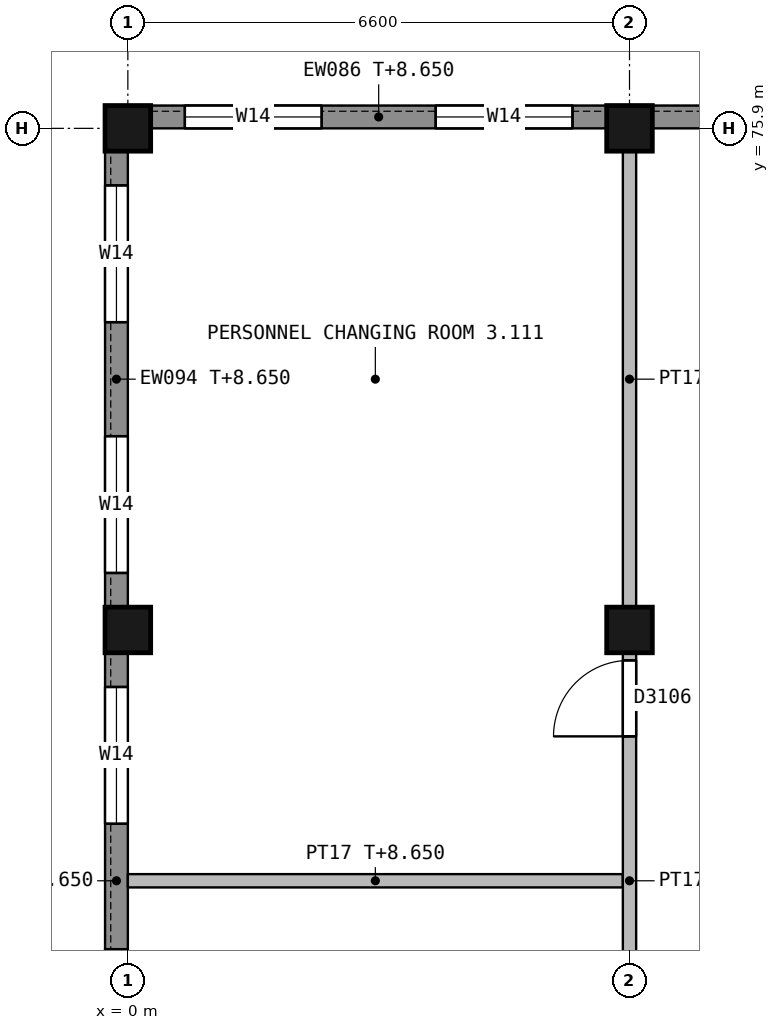
"""IFC4 building model, lengths in metres.
Left out: names, types, materials, properties, quantities, classifications, styles, units other than length and angle.
Written with IfcOpenShell. Run it as: python <this file> out.ifc"""

import sys

from ifc_helpers import new_model, si_unit, direction, frame, frame_2d, origin, origin_2d, place, context, subcontext, project, spatial, rectangle, extrude, element, fill, save


model = new_model("IFC4")
c1 = context("Model", 3, precision=1e-05, world=origin(), true_north=direction((0.0, 1.0)))
c2 = subcontext(c1, "Body", "Model", "MODEL_VIEW")
j1 = project(units=[si_unit("LENGTHUNIT", "METRE"), si_unit("PLANEANGLEUNIT", "RADIAN")], contexts=[c1])
p1 = place(None, origin())
s1 = spatial("IfcSite", under=j1, at=p1, CompositionType="ELEMENT")
p2 = place(p1, origin())
s2 = spatial("IfcBuilding", under=s1, at=p2, CompositionType="ELEMENT")
p3 = place(p2, frame((0.0, 0.0, 5.4)))
s3 = spatial("IfcBuildingStorey", under=s2, at=p3, CompositionType="ELEMENT", Elevation=5.4)
for number, where, z_axis, x_axis in (
    (1, (0.0, 69.3, 0.0), (0.0, 0.0, 1.0), (1.0, 0.0, 0.0)),
    (2, (0.0, 75.9, 0.0), (0.0, 0.0, 1.0), (1.0, 0.0, 0.0)),
    (3, (6.6, 69.3, 0.0), (0.0, 0.0, 1.0), (1.0, 0.0, 0.0)),
    (4, (6.6, 75.9, 0.0), (0.0, 0.0, 1.0), (1.0, 0.0, 0.0)),
):
    element("IfcColumn", number, at=place(p3, frame(where, z_axis=z_axis, x_axis=x_axis)), inside=s3, PredefinedType="COLUMN", context=c2, shape_type="SweptSolid", body=[
        extrude(rectangle(XDim=0.6, YDim=0.6, at=origin_2d()), origin(), (0.0, 0.0, 1.0), 4.5),
    ])
p4 = place(p3, frame((0.3, 76.05, 0.0), z_axis=(0.0, 0.0, 1.0), x_axis=(1.0, 0.0, 0.0)))
e5 = element("IfcWall", 5, at=p4, inside=s3, PredefinedType="STANDARD", context=c2, shape_type="SweptSolid", body=[
    extrude(rectangle(XDim=6.0, YDim=0.3, at=frame_2d((3.0, 0.0))), origin(), (0.0, 0.0, 1.0), 3.25),
])
p5 = place(p4, frame((0.45, 0.0, 0.9)))
e6 = element("IfcOpeningElement", 6, at=p5, cuts=e5, PredefinedType="OPENING", context=c2, shape_type="SweptSolid", body=[
    extrude(rectangle(XDim=1.8, YDim=1.5, at=frame_2d((0.9, 0.75))), frame((0.0, 0.16, 0.0), z_axis=(0.0, -1.0, 0.0), x_axis=(1.0, 0.0, 0.0)), (0.0, 0.0, 1.0), 0.32),
])
p6 = place(p4, frame((3.75, 0.0, 0.9)))
e7 = element("IfcOpeningElement", 7, at=p6, cuts=e5, PredefinedType="OPENING", context=c2, shape_type="SweptSolid", body=[
    extrude(rectangle(XDim=1.8, YDim=1.5, at=frame_2d((0.9, 0.75))), frame((0.0, 0.16, 0.0), z_axis=(0.0, -1.0, 0.0), x_axis=(1.0, 0.0, 0.0)), (0.0, 0.0, 1.0), 0.32),
])
p7 = place(p3, frame((6.9, 76.05, 0.0), z_axis=(0.0, 0.0, 1.0), x_axis=(1.0, 0.0, 0.0)))
e8 = element("IfcWall", 8, at=p7, inside=s3, PredefinedType="STANDARD", context=c2, shape_type="SweptSolid", body=[
    extrude(rectangle(XDim=6.0, YDim=0.3, at=frame_2d((3.0, 0.0))), origin(), (0.0, 0.0, 1.0), 3.25),
])
p8 = place(p7, frame((0.75, 0.0, 1.1)))
e9 = element("IfcOpeningElement", 9, at=p8, cuts=e8, PredefinedType="OPENING", context=c2, shape_type="SweptSolid", body=[
    extrude(rectangle(XDim=1.2, YDim=1.2, at=frame_2d((0.6, 0.6))), frame((0.0, 0.16, 0.0), z_axis=(0.0, -1.0, 0.0), x_axis=(1.0, 0.0, 0.0)), (0.0, 0.0, 1.0), 0.32),
])
p9 = place(p7, frame((4.05, 0.0, 1.1)))
e10 = element("IfcOpeningElement", 10, at=p9, cuts=e8, PredefinedType="OPENING", context=c2, shape_type="SweptSolid", body=[
    extrude(rectangle(XDim=1.2, YDim=1.2, at=frame_2d((0.6, 0.6))), frame((0.0, 0.16, 0.0), z_axis=(0.0, -1.0, 0.0), x_axis=(1.0, 0.0, 0.0)), (0.0, 0.0, 1.0), 0.32),
])
p10 = place(p3, frame((-0.15, 63.0, 0.0), z_axis=(0.0, 0.0, 1.0), x_axis=(0.0, 1.0, 0.0)))
e11 = element("IfcWall", 11, at=p10, inside=s3, PredefinedType="STANDARD", context=c2, shape_type="SweptSolid", body=[
    extrude(rectangle(XDim=6.0, YDim=0.3, at=frame_2d((3.0, 0.0))), origin(), (0.0, 0.0, 1.0), 3.25),
])
p11 = place(p10, frame((0.6, 0.0, 1.2)))
e12 = element("IfcOpeningElement", 12, at=p11, cuts=e11, PredefinedType="OPENING", context=c2, shape_type="SweptSolid", body=[
    extrude(rectangle(XDim=1.5, YDim=1.2, at=frame_2d((0.75, 0.6))), frame((0.0, 0.16, 0.0), z_axis=(0.0, -1.0, 0.0), x_axis=(1.0, 0.0, 0.0)), (0.0, 0.0, 1.0), 0.32),
])
p12 = place(p10, frame((3.75, 0.0, 0.9)))
e13 = element("IfcOpeningElement", 13, at=p12, cuts=e11, PredefinedType="OPENING", context=c2, shape_type="SweptSolid", body=[
    extrude(rectangle(XDim=1.8, YDim=1.5, at=frame_2d((0.9, 0.75))), frame((0.0, 0.16, 0.0), z_axis=(0.0, -1.0, 0.0), x_axis=(1.0, 0.0, 0.0)), (0.0, 0.0, 1.0), 0.32),
])
p13 = place(p3, frame((-0.15, 69.6, 0.0), z_axis=(0.0, 0.0, 1.0), x_axis=(0.0, 1.0, 0.0)))
e14 = element("IfcWall", 14, at=p13, inside=s3, PredefinedType="STANDARD", context=c2, shape_type="SweptSolid", body=[
    extrude(rectangle(XDim=6.0, YDim=0.3, at=frame_2d((3.0, 0.0))), origin(), (0.0, 0.0, 1.0), 3.25),
])
p14 = place(p13, frame((0.45, 0.0, 0.9)))
e15 = element("IfcOpeningElement", 15, at=p14, cuts=e14, PredefinedType="OPENING", context=c2, shape_type="SweptSolid", body=[
    extrude(rectangle(XDim=1.8, YDim=1.5, at=frame_2d((0.9, 0.75))), frame((0.0, 0.16, 0.0), z_axis=(0.0, -1.0, 0.0), x_axis=(1.0, 0.0, 0.0)), (0.0, 0.0, 1.0), 0.32),
])
p15 = place(p13, frame((3.75, 0.0, 0.9)))
e16 = element("IfcOpeningElement", 16, at=p15, cuts=e14, PredefinedType="OPENING", context=c2, shape_type="SweptSolid", body=[
    extrude(rectangle(XDim=1.8, YDim=1.5, at=frame_2d((0.9, 0.75))), frame((0.0, 0.16, 0.0), z_axis=(0.0, -1.0, 0.0), x_axis=(1.0, 0.0, 0.0)), (0.0, 0.0, 1.0), 0.32),
])
p16 = place(p3, frame((0.0, 66.0, 0.0), z_axis=(0.0, 0.0, 1.0), x_axis=(1.0, 0.0, 0.0)))
e17 = element("IfcWall", 17, at=p16, inside=s3, PredefinedType="PARTITIONING", context=c2, shape_type="SweptSolid", body=[
    extrude(rectangle(XDim=6.512, YDim=0.175, at=frame_2d((3.256, 0.0))), origin(), (0.0, 0.0, 1.0), 3.25),
])
p17 = place(p3, frame((6.6, 63.0, 0.0), z_axis=(0.0, 0.0, 1.0), x_axis=(0.0, 1.0, 0.0)))
e18 = element("IfcWall", 18, at=p17, inside=s3, PredefinedType="PARTITIONING", context=c2, shape_type="SweptSolid", body=[
    extrude(rectangle(XDim=6.0, YDim=0.175, at=frame_2d((3.0, 0.0))), origin(), (0.0, 0.0, 1.0), 3.25),
])
p18 = place(p17, frame((4.9, 0.0, 0.0)))
e19 = element("IfcOpeningElement", 19, at=p18, cuts=e18, PredefinedType="OPENING", context=c2, shape_type="SweptSolid", body=[
    extrude(rectangle(XDim=1.0, YDim=2.1, at=frame_2d((0.5, 1.05))), frame((0.0, 0.097, 0.0), z_axis=(0.0, -1.0, 0.0), x_axis=(1.0, 0.0, 0.0)), (0.0, 0.0, 1.0), 0.195),
])
p19 = place(p3, frame((6.6, 69.6, 0.0), z_axis=(0.0, 0.0, 1.0), x_axis=(0.0, 1.0, 0.0)))
e20 = element("IfcWall", 20, at=p19, inside=s3, PredefinedType="PARTITIONING", context=c2, shape_type="SweptSolid", body=[
    extrude(rectangle(XDim=6.0, YDim=0.175, at=frame_2d((3.0, 0.0))), origin(), (0.0, 0.0, 1.0), 3.25),
])
p20 = place(p5, origin())
e21 = element("IfcWindow", 21, at=p20, inside=s3, PartitioningType="SINGLE_PANEL", PredefinedType="WINDOW", context=c2, shape_type="SweptSolid", body=[
    extrude(rectangle(XDim=1.8, YDim=1.5, at=frame_2d((0.9, 0.75))), frame((0.0, 0.03, 0.0), z_axis=(0.0, -1.0, 0.0), x_axis=(1.0, 0.0, 0.0)), (0.0, 0.0, 1.0), 0.06),
])
fill(e6, e21)
p21 = place(p6, origin())
e22 = element("IfcWindow", 22, at=p21, inside=s3, PartitioningType="SINGLE_PANEL", PredefinedType="WINDOW", context=c2, shape_type="SweptSolid", body=[
    extrude(rectangle(XDim=1.8, YDim=1.5, at=frame_2d((0.9, 0.75))), frame((0.0, 0.03, 0.0), z_axis=(0.0, -1.0, 0.0), x_axis=(1.0, 0.0, 0.0)), (0.0, 0.0, 1.0), 0.06),
])
fill(e7, e22)
p22 = place(p11, origin())
e23 = element("IfcWindow", 23, at=p22, inside=s3, PartitioningType="SINGLE_PANEL", PredefinedType="WINDOW", context=c2, shape_type="SweptSolid", body=[
    extrude(rectangle(XDim=1.5, YDim=1.2, at=frame_2d((0.75, 0.6))), frame((0.0, 0.03, 0.0), z_axis=(0.0, -1.0, 0.0), x_axis=(1.0, 0.0, 0.0)), (0.0, 0.0, 1.0), 0.06),
])
fill(e12, e23)
p23 = place(p12, origin())
e24 = element("IfcWindow", 24, at=p23, inside=s3, PartitioningType="SINGLE_PANEL", PredefinedType="WINDOW", context=c2, shape_type="SweptSolid", body=[
    extrude(rectangle(XDim=1.8, YDim=1.5, at=frame_2d((0.9, 0.75))), frame((0.0, 0.03, 0.0), z_axis=(0.0, -1.0, 0.0), x_axis=(1.0, 0.0, 0.0)), (0.0, 0.0, 1.0), 0.06),
])
fill(e13, e24)
p24 = place(p14, origin())
e25 = element("IfcWindow", 25, at=p24, inside=s3, PartitioningType="SINGLE_PANEL", PredefinedType="WINDOW", context=c2, shape_type="SweptSolid", body=[
    extrude(rectangle(XDim=1.8, YDim=1.5, at=frame_2d((0.9, 0.75))), frame((0.0, 0.03, 0.0), z_axis=(0.0, -1.0, 0.0), x_axis=(1.0, 0.0, 0.0)), (0.0, 0.0, 1.0), 0.06),
])
fill(e15, e25)
p25 = place(p15, origin())
e26 = element("IfcWindow", 26, at=p25, inside=s3, PartitioningType="SINGLE_PANEL", PredefinedType="WINDOW", context=c2, shape_type="SweptSolid", body=[
    extrude(rectangle(XDim=1.8, YDim=1.5, at=frame_2d((0.9, 0.75))), frame((0.0, 0.03, 0.0), z_axis=(0.0, -1.0, 0.0), x_axis=(1.0, 0.0, 0.0)), (0.0, 0.0, 1.0), 0.06),
])
fill(e16, e26)
p26 = place(p18, origin())
e27 = element("IfcDoor", 27, at=p26, inside=s3, OperationType="SINGLE_SWING_LEFT", PredefinedType="DOOR", context=c2, shape_type="SweptSolid", body=[
    extrude(rectangle(XDim=1.0, YDim=2.1, at=frame_2d((0.5, 1.05))), frame((0.0, 0.025, 0.0), z_axis=(0.0, -1.0, 0.0), x_axis=(1.0, 0.0, 0.0)), (0.0, 0.0, 1.0), 0.05),
])
fill(e19, e27)
save(model, sys.argv[1])
